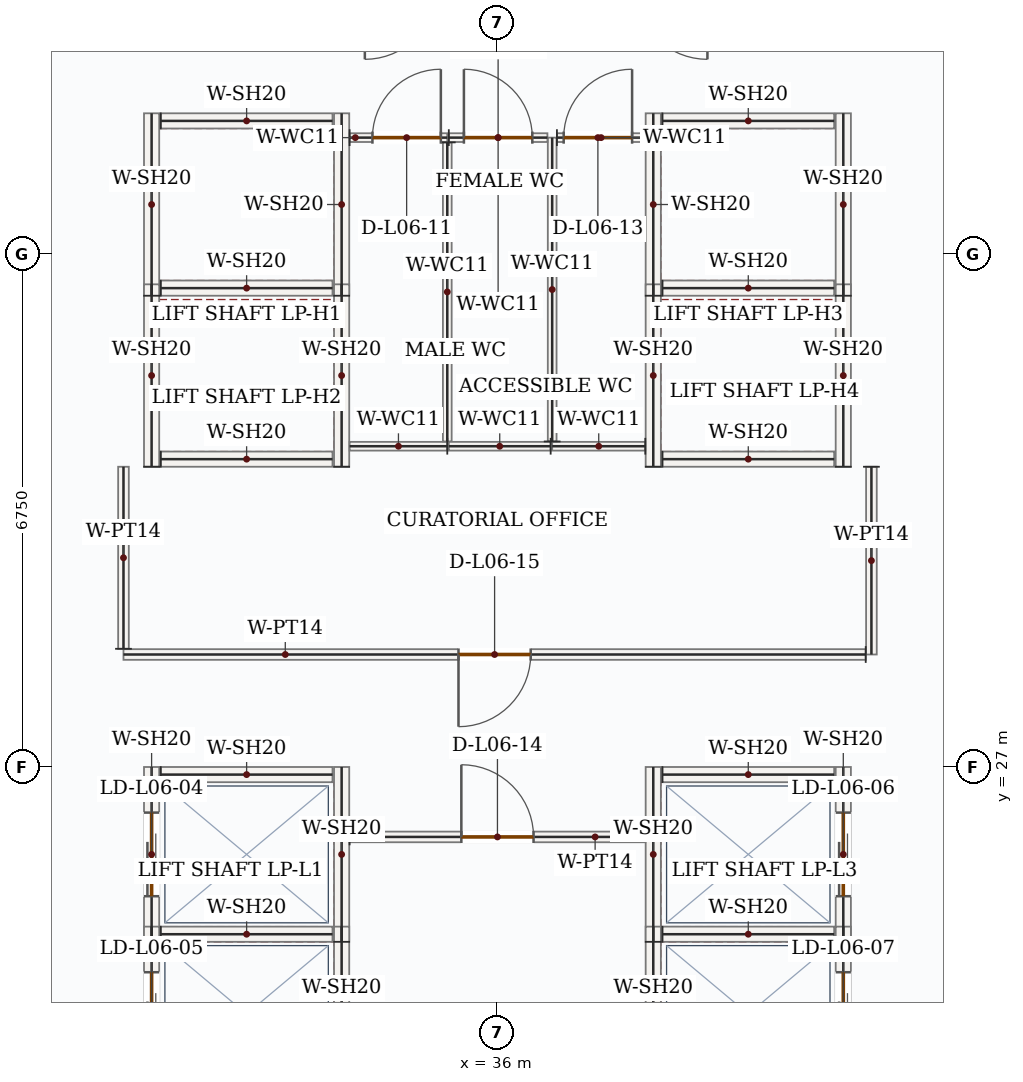
"""IFC4 building model, lengths in metres.
Left out: names, types, materials, properties, quantities, classifications, styles, units other than length and angle.
Written with IfcOpenShell. Run it as: python <this file> out.ifc"""

import sys

from ifc_helpers import new_model, si_unit, direction, frame, frame_2d, origin, place, context, subcontext, project, spatial, rectangle, extrude, source, transform, mapped, element, fill, save


model = new_model("IFC4")
c1 = context("Model", 3, precision=1e-05, world=origin(), true_north=direction((0.0, 1.0)))
c2 = subcontext(c1, "Body", "Model", "MODEL_VIEW")
j1 = project(units=[si_unit("LENGTHUNIT", "METRE"), si_unit("PLANEANGLEUNIT", "RADIAN")], contexts=[c1])
p1 = place(None, origin())
s1 = spatial("IfcSite", under=j1, at=p1, CompositionType="ELEMENT")
p2 = place(p1, origin())
s2 = spatial("IfcBuilding", under=s1, at=p2, CompositionType="ELEMENT")
p3 = place(p2, frame((0.0, 0.0, 33.3)))
s3 = spatial("IfcBuildingStorey", under=s2, at=p3, CompositionType="ELEMENT", Elevation=33.3)
m1 = source(origin(), c2, "Body", "SweptSolid", [
    extrude(rectangle(XDim=2.4, YDim=0.2, at=frame_2d((1.2, 0.0))), origin(), (0.0, 0.0, 1.0), 3.95),
])
for number, where, z_axis, x_axis in (
    (1, (31.45, 33.2, 0.0), (0.0, 0.0, 1.0), (0.0, 1.0, 0.0)),
    (2, (33.95, 33.2, 0.0), (0.0, 0.0, 1.0), (0.0, 1.0, 0.0)),
):
    element("IfcWall", number, at=place(p3, frame(where, z_axis=z_axis, x_axis=x_axis)), inside=s3, PredefinedType="SOLIDWALL", context=c2, shape_type="MappedRepresentation", body=[
        mapped(m1, transform((0.0, 0.0, 0.0), x_axis=(1.0, 0.0, 0.0), y_axis=(0.0, 1.0, 0.0), z_axis=(0.0, 0.0, 1.0), scale=1.0)),
    ])
m2 = source(origin(), c2, "Body", "SweptSolid", [
    extrude(rectangle(XDim=2.26, YDim=0.2, at=frame_2d((1.13, 0.0))), origin(), (0.0, 0.0, 1.0), 3.95),
])
for number, where, z_axis, x_axis in (
    (3, (31.57, 33.3, 0.0), (0.0, 0.0, 1.0), (1.0, 0.0, 0.0)),
    (4, (31.57, 35.5, 0.0), (0.0, 0.0, 1.0), (1.0, 0.0, 0.0)),
):
    element("IfcWall", number, at=place(p3, frame(where, z_axis=z_axis, x_axis=x_axis)), inside=s3, PredefinedType="SOLIDWALL", context=c2, shape_type="MappedRepresentation", body=[
        mapped(m2, transform((0.0, 0.0, 0.0), x_axis=(1.0, 0.0, 0.0), y_axis=(0.0, 1.0, 0.0), z_axis=(0.0, 0.0, 1.0), scale=1.0)),
    ])
for number, where, z_axis, x_axis in (
    (5, (31.45, 30.95, 0.0), (0.0, 0.0, 1.0), (0.0, 1.0, 0.0)),
    (6, (33.95, 30.95, 0.0), (0.0, 0.0, 1.0), (0.0, 1.0, 0.0)),
):
    element("IfcWall", number, at=place(p3, frame(where, z_axis=z_axis, x_axis=x_axis)), inside=s3, PredefinedType="SOLIDWALL", context=c2, shape_type="MappedRepresentation", body=[
        mapped(m1, transform((0.0, 0.0, 0.0), x_axis=(1.0, 0.0, 0.0), y_axis=(0.0, 1.0, 0.0), z_axis=(0.0, 0.0, 1.0), scale=1.0)),
    ])
p4 = place(p3, frame((31.57, 31.05, 0.0), z_axis=(0.0, 0.0, 1.0), x_axis=(1.0, 0.0, 0.0)))
e7 = element("IfcWall", 7, at=p4, inside=s3, PredefinedType="SOLIDWALL", context=c2, shape_type="MappedRepresentation", body=[
    mapped(m2, transform((0.0, 0.0, 0.0), x_axis=(1.0, 0.0, 0.0), y_axis=(0.0, 1.0, 0.0), z_axis=(0.0, 0.0, 1.0), scale=1.0)),
])
for number, where, z_axis, x_axis in (
    (8, (38.05, 33.2, 0.0), (0.0, 0.0, 1.0), (0.0, 1.0, 0.0)),
    (9, (40.55, 33.2, 0.0), (0.0, 0.0, 1.0), (0.0, 1.0, 0.0)),
):
    element("IfcWall", number, at=place(p3, frame(where, z_axis=z_axis, x_axis=x_axis)), inside=s3, PredefinedType="SOLIDWALL", context=c2, shape_type="MappedRepresentation", body=[
        mapped(m1, transform((0.0, 0.0, 0.0), x_axis=(1.0, 0.0, 0.0), y_axis=(0.0, 1.0, 0.0), z_axis=(0.0, 0.0, 1.0), scale=1.0)),
    ])
for number, where, z_axis, x_axis in (
    (10, (38.17, 33.3, 0.0), (0.0, 0.0, 1.0), (1.0, 0.0, 0.0)),
    (11, (38.17, 35.5, 0.0), (0.0, 0.0, 1.0), (1.0, 0.0, 0.0)),
):
    element("IfcWall", number, at=place(p3, frame(where, z_axis=z_axis, x_axis=x_axis)), inside=s3, PredefinedType="SOLIDWALL", context=c2, shape_type="MappedRepresentation", body=[
        mapped(m2, transform((0.0, 0.0, 0.0), x_axis=(1.0, 0.0, 0.0), y_axis=(0.0, 1.0, 0.0), z_axis=(0.0, 0.0, 1.0), scale=1.0)),
    ])
for number, where, z_axis, x_axis in (
    (12, (38.05, 30.95, 0.0), (0.0, 0.0, 1.0), (0.0, 1.0, 0.0)),
    (13, (40.55, 30.95, 0.0), (0.0, 0.0, 1.0), (0.0, 1.0, 0.0)),
):
    element("IfcWall", number, at=place(p3, frame(where, z_axis=z_axis, x_axis=x_axis)), inside=s3, PredefinedType="SOLIDWALL", context=c2, shape_type="MappedRepresentation", body=[
        mapped(m1, transform((0.0, 0.0, 0.0), x_axis=(1.0, 0.0, 0.0), y_axis=(0.0, 1.0, 0.0), z_axis=(0.0, 0.0, 1.0), scale=1.0)),
    ])
p5 = place(p3, frame((38.17, 31.05, 0.0), z_axis=(0.0, 0.0, 1.0), x_axis=(1.0, 0.0, 0.0)))
e14 = element("IfcWall", 14, at=p5, inside=s3, PredefinedType="SOLIDWALL", context=c2, shape_type="MappedRepresentation", body=[
    mapped(m2, transform((0.0, 0.0, 0.0), x_axis=(1.0, 0.0, 0.0), y_axis=(0.0, 1.0, 0.0), z_axis=(0.0, 0.0, 1.0), scale=1.0)),
])
p6 = place(p3, frame((31.45, 24.7, 0.0), z_axis=(0.0, 0.0, 1.0), x_axis=(0.0, 1.0, 0.0)))
e15 = element("IfcWall", 15, at=p6, inside=s3, PredefinedType="SOLIDWALL", context=c2, shape_type="SweptSolid", body=[
    extrude(rectangle(XDim=2.3, YDim=0.2, at=frame_2d((1.15, 0.0))), origin(), (0.0, 0.0, 1.0), 3.95),
])
p7 = place(p6, frame((0.6, 0.0, 0.0)))
e16 = element("IfcOpeningElement", 16, at=p7, cuts=e15, PredefinedType="OPENING", context=c2, shape_type="SweptSolid", body=[
    extrude(rectangle(XDim=1.1, YDim=2.15, at=frame_2d((0.55, 1.075))), frame((0.0, 0.11, 0.0), z_axis=(0.0, -1.0, 0.0), x_axis=(1.0, 0.0, 0.0)), (0.0, 0.0, 1.0), 0.22),
])
m3 = source(origin(), c2, "Body", "SweptSolid", [
    extrude(rectangle(XDim=2.3, YDim=0.2, at=frame_2d((1.15, 0.0))), origin(), (0.0, 0.0, 1.0), 3.95),
])
p8 = place(p3, frame((33.95, 24.7, 0.0), z_axis=(0.0, 0.0, 1.0), x_axis=(0.0, 1.0, 0.0)))
e17 = element("IfcWall", 17, at=p8, inside=s3, PredefinedType="SOLIDWALL", context=c2, shape_type="MappedRepresentation", body=[
    mapped(m3, transform((0.0, 0.0, 0.0), x_axis=(1.0, 0.0, 0.0), y_axis=(0.0, 1.0, 0.0), z_axis=(0.0, 0.0, 1.0), scale=1.0)),
])
for number, where, z_axis, x_axis in (
    (18, (31.57, 24.8, 0.0), (0.0, 0.0, 1.0), (1.0, 0.0, 0.0)),
    (19, (31.57, 26.9, 0.0), (0.0, 0.0, 1.0), (1.0, 0.0, 0.0)),
):
    element("IfcWall", number, at=place(p3, frame(where, z_axis=z_axis, x_axis=x_axis)), inside=s3, PredefinedType="SOLIDWALL", context=c2, shape_type="MappedRepresentation", body=[
        mapped(m2, transform((0.0, 0.0, 0.0), x_axis=(1.0, 0.0, 0.0), y_axis=(0.0, 1.0, 0.0), z_axis=(0.0, 0.0, 1.0), scale=1.0)),
    ])
p9 = place(p3, frame((31.45, 22.6, 0.0), z_axis=(0.0, 0.0, 1.0), x_axis=(0.0, 1.0, 0.0)))
e20 = element("IfcWall", 20, at=p9, inside=s3, PredefinedType="SOLIDWALL", context=c2, shape_type="SweptSolid", body=[
    extrude(rectangle(XDim=2.3, YDim=0.2, at=frame_2d((1.15, 0.0))), origin(), (0.0, 0.0, 1.0), 3.95),
])
p10 = place(p9, frame((0.6, 0.0, 0.0)))
e21 = element("IfcOpeningElement", 21, at=p10, cuts=e20, PredefinedType="OPENING", context=c2, shape_type="SweptSolid", body=[
    extrude(rectangle(XDim=1.1, YDim=2.15, at=frame_2d((0.55, 1.075))), frame((0.0, 0.11, 0.0), z_axis=(0.0, -1.0, 0.0), x_axis=(1.0, 0.0, 0.0)), (0.0, 0.0, 1.0), 0.22),
])
m4 = source(origin(), c2, "Body", "SweptSolid", [
    extrude(rectangle(XDim=2.3, YDim=0.2, at=frame_2d((1.15, 0.0))), origin(), (0.0, 0.0, 1.0), 3.95),
])
p11 = place(p3, frame((33.95, 22.6, 0.0), z_axis=(0.0, 0.0, 1.0), x_axis=(0.0, 1.0, 0.0)))
e22 = element("IfcWall", 22, at=p11, inside=s3, PredefinedType="SOLIDWALL", context=c2, shape_type="MappedRepresentation", body=[
    mapped(m4, transform((0.0, 0.0, 0.0), x_axis=(1.0, 0.0, 0.0), y_axis=(0.0, 1.0, 0.0), z_axis=(0.0, 0.0, 1.0), scale=1.0)),
])
p12 = place(p3, frame((38.05, 24.7, 0.0), z_axis=(0.0, 0.0, 1.0), x_axis=(0.0, 1.0, 0.0)))
e23 = element("IfcWall", 23, at=p12, inside=s3, PredefinedType="SOLIDWALL", context=c2, shape_type="MappedRepresentation", body=[
    mapped(m3, transform((0.0, 0.0, 0.0), x_axis=(1.0, 0.0, 0.0), y_axis=(0.0, 1.0, 0.0), z_axis=(0.0, 0.0, 1.0), scale=1.0)),
])
p13 = place(p3, frame((40.55, 24.7, 0.0), z_axis=(0.0, 0.0, 1.0), x_axis=(0.0, 1.0, 0.0)))
e24 = element("IfcWall", 24, at=p13, inside=s3, PredefinedType="SOLIDWALL", context=c2, shape_type="SweptSolid", body=[
    extrude(rectangle(XDim=2.3, YDim=0.2, at=frame_2d((1.15, 0.0))), origin(), (0.0, 0.0, 1.0), 3.95),
])
p14 = place(p13, frame((0.6, 0.0, 0.0)))
e25 = element("IfcOpeningElement", 25, at=p14, cuts=e24, PredefinedType="OPENING", context=c2, shape_type="SweptSolid", body=[
    extrude(rectangle(XDim=1.1, YDim=2.15, at=frame_2d((0.55, 1.075))), frame((0.0, 0.11, 0.0), z_axis=(0.0, -1.0, 0.0), x_axis=(1.0, 0.0, 0.0)), (0.0, 0.0, 1.0), 0.22),
])
for number, where, z_axis, x_axis in (
    (26, (38.17, 24.8, 0.0), (0.0, 0.0, 1.0), (1.0, 0.0, 0.0)),
    (27, (38.17, 26.9, 0.0), (0.0, 0.0, 1.0), (1.0, 0.0, 0.0)),
):
    element("IfcWall", number, at=place(p3, frame(where, z_axis=z_axis, x_axis=x_axis)), inside=s3, PredefinedType="SOLIDWALL", context=c2, shape_type="MappedRepresentation", body=[
        mapped(m2, transform((0.0, 0.0, 0.0), x_axis=(1.0, 0.0, 0.0), y_axis=(0.0, 1.0, 0.0), z_axis=(0.0, 0.0, 1.0), scale=1.0)),
    ])
p15 = place(p3, frame((38.05, 22.6, 0.0), z_axis=(0.0, 0.0, 1.0), x_axis=(0.0, 1.0, 0.0)))
e28 = element("IfcWall", 28, at=p15, inside=s3, PredefinedType="SOLIDWALL", context=c2, shape_type="MappedRepresentation", body=[
    mapped(m4, transform((0.0, 0.0, 0.0), x_axis=(1.0, 0.0, 0.0), y_axis=(0.0, 1.0, 0.0), z_axis=(0.0, 0.0, 1.0), scale=1.0)),
])
p16 = place(p3, frame((40.55, 22.6, 0.0), z_axis=(0.0, 0.0, 1.0), x_axis=(0.0, 1.0, 0.0)))
e29 = element("IfcWall", 29, at=p16, inside=s3, PredefinedType="SOLIDWALL", context=c2, shape_type="SweptSolid", body=[
    extrude(rectangle(XDim=2.3, YDim=0.2, at=frame_2d((1.15, 0.0))), origin(), (0.0, 0.0, 1.0), 3.95),
])
p17 = place(p16, frame((0.6, 0.0, 0.0)))
e30 = element("IfcOpeningElement", 30, at=p17, cuts=e29, PredefinedType="OPENING", context=c2, shape_type="SweptSolid", body=[
    extrude(rectangle(XDim=1.1, YDim=2.15, at=frame_2d((0.55, 1.075))), frame((0.0, 0.11, 0.0), z_axis=(0.0, -1.0, 0.0), x_axis=(1.0, 0.0, 0.0)), (0.0, 0.0, 1.0), 0.22),
])
m5 = source(origin(), c2, "Body", "SweptSolid", [
    extrude(rectangle(XDim=1.225, YDim=0.115, at=frame_2d((0.613, 0.0))), origin(), (0.0, 0.0, 1.0), 3.95),
])
p18 = place(p3, frame((37.945, 31.22, 0.0), z_axis=(0.0, 0.0, 1.0), x_axis=(-1.0, 0.0, 0.0)))
e31 = element("IfcWall", 31, at=p18, inside=s3, PredefinedType="PARTITIONING", context=c2, shape_type="MappedRepresentation", body=[
    mapped(m5, transform((0.0, 0.0, 0.0), x_axis=(1.0, 0.0, 0.0), y_axis=(0.0, 1.0, 0.0), z_axis=(0.0, 0.0, 1.0), scale=1.0)),
])
m6 = source(origin(), c2, "Body", "SweptSolid", [
    extrude(rectangle(XDim=3.998, YDim=0.115, at=frame_2d((1.999, 0.0))), origin(), (0.0, 0.0, 1.0), 3.95),
])
p19 = place(p3, frame((36.72, 31.282, 0.0), z_axis=(0.0, 0.0, 1.0), x_axis=(0.0, 1.0, 0.0)))
e32 = element("IfcWall", 32, at=p19, inside=s3, PredefinedType="PARTITIONING", context=c2, shape_type="MappedRepresentation", body=[
    mapped(m6, transform((0.0, 0.0, 0.0), x_axis=(1.0, 0.0, 0.0), y_axis=(0.0, 1.0, 0.0), z_axis=(0.0, 0.0, 1.0), scale=1.0)),
])
p20 = place(p3, frame((36.782, 35.28, 0.0), z_axis=(0.0, 0.0, 1.0), x_axis=(1.0, 0.0, 0.0)))
e33 = element("IfcWall", 33, at=p20, inside=s3, PredefinedType="PARTITIONING", context=c2, shape_type="SweptSolid", body=[
    extrude(rectangle(XDim=1.163, YDim=0.115, at=frame_2d((0.581, 0.0))), origin(), (0.0, 0.0, 1.0), 3.95),
])
p21 = place(p20, frame((0.089, 0.0, 0.0)))
e34 = element("IfcOpeningElement", 34, at=p21, cuts=e33, PredefinedType="OPENING", context=c2, shape_type="SweptSolid", body=[
    extrude(rectangle(XDim=0.9, YDim=2.1, at=frame_2d((0.45, 1.05))), frame((0.0, 0.067, 0.0), z_axis=(0.0, -1.0, 0.0), x_axis=(1.0, 0.0, 0.0)), (0.0, 0.0, 1.0), 0.135),
])
m7 = source(origin(), c2, "Body", "SweptSolid", [
    extrude(rectangle(XDim=1.285, YDim=0.115, at=frame_2d((0.643, 0.0))), origin(), (0.0, 0.0, 1.0), 3.95),
])
p22 = place(p3, frame((35.34, 31.22, 0.0), z_axis=(0.0, 0.0, 1.0), x_axis=(-1.0, 0.0, 0.0)))
e35 = element("IfcWall", 35, at=p22, inside=s3, PredefinedType="PARTITIONING", context=c2, shape_type="MappedRepresentation", body=[
    mapped(m7, transform((0.0, 0.0, 0.0), x_axis=(1.0, 0.0, 0.0), y_axis=(0.0, 1.0, 0.0), z_axis=(0.0, 0.0, 1.0), scale=1.0)),
])
p23 = place(p3, frame((34.055, 35.28, 0.0), z_axis=(0.0, 0.0, 1.0), x_axis=(1.0, 0.0, 0.0)))
e36 = element("IfcWall", 36, at=p23, inside=s3, PredefinedType="PARTITIONING", context=c2, shape_type="SweptSolid", body=[
    extrude(rectangle(XDim=1.285, YDim=0.115, at=frame_2d((0.643, 0.0))), origin(), (0.0, 0.0, 1.0), 3.95),
])
p24 = place(p23, frame((0.3, 0.0, 0.0)))
e37 = element("IfcOpeningElement", 37, at=p24, cuts=e36, PredefinedType="OPENING", context=c2, shape_type="SweptSolid", body=[
    extrude(rectangle(XDim=0.9, YDim=2.1, at=frame_2d((0.45, 1.05))), frame((0.0, 0.067, 0.0), z_axis=(0.0, -1.0, 0.0), x_axis=(1.0, 0.0, 0.0)), (0.0, 0.0, 1.0), 0.135),
])
m8 = source(origin(), c2, "Body", "SweptSolid", [
    extrude(rectangle(XDim=3.935, YDim=0.115, at=frame_2d((1.968, 0.0))), origin(), (0.0, 0.0, 1.0), 3.95),
])
p25 = place(p3, frame((35.34, 35.218, 0.0), z_axis=(0.0, 0.0, 1.0), x_axis=(0.0, -1.0, 0.0)))
e38 = element("IfcWall", 38, at=p25, inside=s3, PredefinedType="PARTITIONING", context=c2, shape_type="MappedRepresentation", body=[
    mapped(m8, transform((0.0, 0.0, 0.0), x_axis=(1.0, 0.0, 0.0), y_axis=(0.0, 1.0, 0.0), z_axis=(0.0, 0.0, 1.0), scale=1.0)),
])
m9 = source(origin(), c2, "Body", "SweptSolid", [
    extrude(rectangle(XDim=1.34, YDim=0.115, at=frame_2d((0.67, 0.0))), origin(), (0.0, 0.0, 1.0), 3.95),
])
p26 = place(p3, frame((36.7, 31.22, 0.0), z_axis=(0.0, 0.0, 1.0), x_axis=(-1.0, 0.0, 0.0)))
e39 = element("IfcWall", 39, at=p26, inside=s3, PredefinedType="PARTITIONING", context=c2, shape_type="MappedRepresentation", body=[
    mapped(m9, transform((0.0, 0.0, 0.0), x_axis=(1.0, 0.0, 0.0), y_axis=(0.0, 1.0, 0.0), z_axis=(0.0, 0.0, 1.0), scale=1.0)),
])
p27 = place(p3, frame((35.36, 35.28, 0.0), z_axis=(0.0, 0.0, 1.0), x_axis=(1.0, 0.0, 0.0)))
e40 = element("IfcWall", 40, at=p27, inside=s3, PredefinedType="PARTITIONING", context=c2, shape_type="SweptSolid", body=[
    extrude(rectangle(XDim=1.297, YDim=0.115, at=frame_2d((0.649, 0.0))), origin(), (0.0, 0.0, 1.0), 3.95),
])
p28 = place(p27, frame((0.199, 0.0, 0.0)))
e41 = element("IfcOpeningElement", 41, at=p28, cuts=e40, PredefinedType="OPENING", context=c2, shape_type="SweptSolid", body=[
    extrude(rectangle(XDim=0.9, YDim=2.1, at=frame_2d((0.45, 1.05))), frame((0.0, 0.067, 0.0), z_axis=(0.0, -1.0, 0.0), x_axis=(1.0, 0.0, 0.0)), (0.0, 0.0, 1.0), 0.135),
])
p29 = place(p3, frame((34.055, 26.08, 0.0), z_axis=(0.0, 0.0, 1.0), x_axis=(1.0, 0.0, 0.0)))
e42 = element("IfcWall", 42, at=p29, inside=s3, PredefinedType="PARTITIONING", context=c2, shape_type="SweptSolid", body=[
    extrude(rectangle(XDim=3.89, YDim=0.14, at=frame_2d((1.945, 0.0))), origin(), (0.0, 0.0, 1.0), 3.95),
])
p30 = place(p29, frame((1.47, 0.0, 0.0)))
e43 = element("IfcOpeningElement", 43, at=p30, cuts=e42, PredefinedType="OPENING", context=c2, shape_type="SweptSolid", body=[
    extrude(rectangle(XDim=0.95, YDim=2.15, at=frame_2d((0.475, 1.075))), frame((0.0, 0.08, 0.0), z_axis=(0.0, -1.0, 0.0), x_axis=(1.0, 0.0, 0.0)), (0.0, 0.0, 1.0), 0.16),
])
m10 = source(origin(), c2, "Body", "SweptSolid", [
    extrude(rectangle(XDim=2.47, YDim=0.14, at=frame_2d((1.235, 0.0))), origin(), (0.0, 0.0, 1.0), 3.95),
])
p31 = place(p3, frame((40.92, 30.95, 0.0), z_axis=(0.0, 0.0, 1.0), x_axis=(0.0, -1.0, 0.0)))
e44 = element("IfcWall", 44, at=p31, inside=s3, PredefinedType="PARTITIONING", context=c2, shape_type="MappedRepresentation", body=[
    mapped(m10, transform((0.0, 0.0, 0.0), x_axis=(1.0, 0.0, 0.0), y_axis=(0.0, 1.0, 0.0), z_axis=(0.0, 0.0, 1.0), scale=1.0)),
])
p32 = place(p3, frame((40.845, 28.48, 0.0), z_axis=(0.0, 0.0, 1.0), x_axis=(-1.0, 0.0, 0.0)))
e45 = element("IfcWall", 45, at=p32, inside=s3, PredefinedType="PARTITIONING", context=c2, shape_type="SweptSolid", body=[
    extrude(rectangle(XDim=9.765, YDim=0.14, at=frame_2d((4.882, 0.0))), origin(), (0.0, 0.0, 1.0), 3.95),
])
p33 = place(p32, frame((4.407, 0.0, 0.0)))
e46 = element("IfcOpeningElement", 46, at=p33, cuts=e45, PredefinedType="OPENING", context=c2, shape_type="SweptSolid", body=[
    extrude(rectangle(XDim=0.95, YDim=2.15, at=frame_2d((0.475, 1.075))), frame((0.0, 0.08, 0.0), z_axis=(0.0, -1.0, 0.0), x_axis=(1.0, 0.0, 0.0)), (0.0, 0.0, 1.0), 0.16),
])
m11 = source(origin(), c2, "Body", "SweptSolid", [
    extrude(rectangle(XDim=2.395, YDim=0.14, at=frame_2d((1.198, 0.0))), origin(), (0.0, 0.0, 1.0), 3.95),
])
p34 = place(p3, frame((31.08, 28.555, 0.0), z_axis=(0.0, 0.0, 1.0), x_axis=(0.0, 1.0, 0.0)))
e47 = element("IfcWall", 47, at=p34, inside=s3, PredefinedType="PARTITIONING", context=c2, shape_type="MappedRepresentation", body=[
    mapped(m11, transform((0.0, 0.0, 0.0), x_axis=(1.0, 0.0, 0.0), y_axis=(0.0, 1.0, 0.0), z_axis=(0.0, 0.0, 1.0), scale=1.0)),
])
m12 = source(origin(), c2, "Body", "SweptSolid", [
    extrude(rectangle(XDim=1.1, YDim=2.15, at=frame_2d((0.55, 1.075))), frame((0.0, 0.025, 0.0), z_axis=(0.0, -1.0, 0.0), x_axis=(1.0, 0.0, 0.0)), (0.0, 0.0, 1.0), 0.05),
])
p35 = place(p7, origin())
e48 = element("IfcDoor", 48, at=p35, inside=s3, OperationType="DOUBLE_DOOR_SLIDING", PredefinedType="DOOR", context=c2, shape_type="MappedRepresentation", body=[
    mapped(m12, transform((0.0, 0.0, 0.0), x_axis=(1.0, 0.0, 0.0), y_axis=(0.0, 1.0, 0.0), z_axis=(0.0, 0.0, 1.0), scale=1.0)),
])
fill(e16, e48)
p36 = place(p10, origin())
e49 = element("IfcDoor", 49, at=p36, inside=s3, OperationType="DOUBLE_DOOR_SLIDING", PredefinedType="DOOR", context=c2, shape_type="MappedRepresentation", body=[
    mapped(m12, transform((0.0, 0.0, 0.0), x_axis=(1.0, 0.0, 0.0), y_axis=(0.0, 1.0, 0.0), z_axis=(0.0, 0.0, 1.0), scale=1.0)),
])
fill(e21, e49)
p37 = place(p14, origin())
e50 = element("IfcDoor", 50, at=p37, inside=s3, OperationType="DOUBLE_DOOR_SLIDING", PredefinedType="DOOR", context=c2, shape_type="MappedRepresentation", body=[
    mapped(m12, transform((0.0, 0.0, 0.0), x_axis=(1.0, 0.0, 0.0), y_axis=(0.0, 1.0, 0.0), z_axis=(0.0, 0.0, 1.0), scale=1.0)),
])
fill(e25, e50)
p38 = place(p17, origin())
e51 = element("IfcDoor", 51, at=p38, inside=s3, OperationType="DOUBLE_DOOR_SLIDING", PredefinedType="DOOR", context=c2, shape_type="MappedRepresentation", body=[
    mapped(m12, transform((0.0, 0.0, 0.0), x_axis=(1.0, 0.0, 0.0), y_axis=(0.0, 1.0, 0.0), z_axis=(0.0, 0.0, 1.0), scale=1.0)),
])
fill(e30, e51)
m13 = source(origin(), c2, "Body", "SweptSolid", [
    extrude(rectangle(XDim=0.9, YDim=2.1, at=frame_2d((0.45, 1.05))), frame((0.0, 0.025, 0.0), z_axis=(0.0, -1.0, 0.0), x_axis=(1.0, 0.0, 0.0)), (0.0, 0.0, 1.0), 0.05),
])
p39 = place(p24, origin())
e52 = element("IfcDoor", 52, at=p39, inside=s3, OperationType="SINGLE_SWING_RIGHT", PredefinedType="DOOR", context=c2, shape_type="MappedRepresentation", body=[
    mapped(m13, transform((0.0, 0.0, 0.0), x_axis=(1.0, 0.0, 0.0), y_axis=(0.0, 1.0, 0.0), z_axis=(0.0, 0.0, 1.0), scale=1.0)),
])
fill(e37, e52)
p40 = place(p28, origin())
e53 = element("IfcDoor", 53, at=p40, inside=s3, OperationType="SINGLE_SWING_LEFT", PredefinedType="DOOR", context=c2, shape_type="MappedRepresentation", body=[
    mapped(m13, transform((0.0, 0.0, 0.0), x_axis=(1.0, 0.0, 0.0), y_axis=(0.0, 1.0, 0.0), z_axis=(0.0, 0.0, 1.0), scale=1.0)),
])
fill(e41, e53)
p41 = place(p21, origin())
e54 = element("IfcDoor", 54, at=p41, inside=s3, OperationType="SINGLE_SWING_RIGHT", PredefinedType="DOOR", context=c2, shape_type="MappedRepresentation", body=[
    mapped(m13, transform((0.0, 0.0, 0.0), x_axis=(1.0, 0.0, 0.0), y_axis=(0.0, 1.0, 0.0), z_axis=(0.0, 0.0, 1.0), scale=1.0)),
])
fill(e34, e54)
m14 = source(origin(), c2, "Body", "SweptSolid", [
    extrude(rectangle(XDim=0.95, YDim=2.15, at=frame_2d((0.475, 1.075))), frame((0.0, 0.025, 0.0), z_axis=(0.0, -1.0, 0.0), x_axis=(1.0, 0.0, 0.0)), (0.0, 0.0, 1.0), 0.05),
])
p42 = place(p30, origin())
e55 = element("IfcDoor", 55, at=p42, inside=s3, OperationType="SINGLE_SWING_LEFT", PredefinedType="DOOR", context=c2, shape_type="MappedRepresentation", body=[
    mapped(m14, transform((0.0, 0.0, 0.0), x_axis=(1.0, 0.0, 0.0), y_axis=(0.0, 1.0, 0.0), z_axis=(0.0, 0.0, 1.0), scale=1.0)),
])
fill(e43, e55)
p43 = place(p33, origin())
e56 = element("IfcDoor", 56, at=p43, inside=s3, OperationType="SINGLE_SWING_RIGHT", PredefinedType="DOOR", context=c2, shape_type="MappedRepresentation", body=[
    mapped(m14, transform((0.0, 0.0, 0.0), x_axis=(1.0, 0.0, 0.0), y_axis=(0.0, 1.0, 0.0), z_axis=(0.0, 0.0, 1.0), scale=1.0)),
])
fill(e46, e56)
save(model, sys.argv[1])
